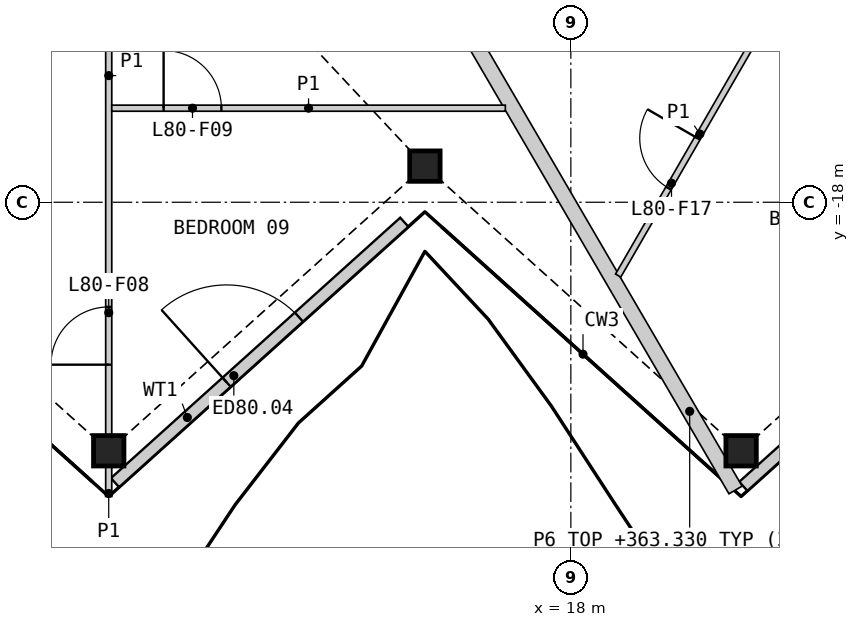
"""IFC4 building model, lengths in metres.
Left out: names, types, materials, properties, quantities, classifications, styles, units other than length and angle.
Written with IfcOpenShell. Run it as: python <this file> out.ifc"""

import sys

from ifc_helpers import new_model, si_unit, direction, frame, frame_2d, origin, origin_2d, place, context, subcontext, project, spatial, rectangle, hollow_rectangle, extrude, element, fill, save


model = new_model("IFC4")
c1 = context("Model", 3, precision=1e-05, world=origin(), true_north=direction((0.0, 1.0)))
c2 = subcontext(c1, "Body", "Model", "MODEL_VIEW")
j1 = project(units=[si_unit("LENGTHUNIT", "METRE"), si_unit("PLANEANGLEUNIT", "RADIAN")], contexts=[c1])
p1 = place(None, origin())
s1 = spatial("IfcSite", under=j1, at=p1, CompositionType="ELEMENT")
p2 = place(p1, origin())
s2 = spatial("IfcBuilding", under=s1, at=p2, CompositionType="ELEMENT")
p3 = place(p2, frame((0.0, 0.0, 361.0)))
s3 = spatial("IfcBuildingStorey", under=s2, at=p3, CompositionType="ELEMENT", Elevation=361.0)
for number, where, z_axis, x_axis in (
    (1, (10.4, -22.088, 0.0), (0.0, 0.0, 1.0), (1.0, 0.0, 0.0)),
    (2, (15.6, -17.406, 0.0), (0.0, 0.0, 1.0), (1.0, 0.0, 0.0)),
    (3, (20.8, -22.088, 0.0), (0.0, 0.0, 1.0), (1.0, 0.0, 0.0)),
):
    element("IfcColumn", number, at=place(p3, frame(where, z_axis=z_axis, x_axis=x_axis)), inside=s3, PredefinedType="COLUMN", context=c2, shape_type="SweptSolid", body=[
        extrude(hollow_rectangle(XDim=0.5, YDim=0.5, WallThickness=0.03, at=origin_2d()), origin(), (0.0, 0.0, 1.0), 3.4),
    ])
p4 = place(p3, frame((10.503, -22.612, 0.0), z_axis=(0.0, 0.0, 1.0), x_axis=(0.743148117717, 0.669126949939, 0.0)))
e4 = element("IfcWall", 4, at=p4, inside=s3, PredefinedType="SOLIDWALL", context=c2, shape_type="SweptSolid", body=[
    extrude(rectangle(XDim=6.402, YDim=0.2, at=frame_2d((3.201, 0.0))), origin(), (0.0, 0.0, 1.0), 2.634),
])
p5 = place(p4, frame((2.469, 0.0, 0.0)))
e5 = element("IfcOpeningElement", 5, at=p5, cuts=e4, PredefinedType="OPENING", context=c2, shape_type="SweptSolid", body=[
    extrude(rectangle(XDim=1.6, YDim=2.25, at=frame_2d((0.8, 1.125))), frame((0.0, 0.11, 0.0), z_axis=(0.0, -1.0, 0.0), x_axis=(1.0, 0.0, 0.0)), (0.0, 0.0, 1.0), 0.22),
])
p6 = place(p3, frame((20.837, -22.672, 0.0), z_axis=(0.0, 0.0, 1.0), x_axis=(0.743143698099, 0.669131858437, 0.0)))
e6 = element("IfcWall", 6, at=p6, inside=s3, PredefinedType="SOLIDWALL", context=c2, shape_type="SweptSolid", body=[
    extrude(rectangle(XDim=6.779, YDim=0.2, at=frame_2d((3.389, 0.0))), origin(), (0.0, 0.0, 1.0), 2.634),
])
p7 = place(p6, frame((2.559, 0.0, 0.0)))
e7 = element("IfcOpeningElement", 7, at=p7, cuts=e6, PredefinedType="OPENING", context=c2, shape_type="SweptSolid", body=[
    extrude(rectangle(XDim=1.6, YDim=2.25, at=frame_2d((0.8, 1.125))), frame((0.0, 0.11, 0.0), z_axis=(0.0, -1.0, 0.0), x_axis=(1.0, 0.0, 0.0)), (0.0, 0.0, 1.0), 0.22),
])
p8 = place(p3, frame((13.168, -9.798, 0.0), z_axis=(0.0, 0.0, 1.0), x_axis=(0.503632750219, -0.863917850786, 0.0)))
e8 = element("IfcWall", 8, at=p8, inside=s3, PredefinedType="PARTITIONING", context=c2, shape_type="SweptSolid", body=[
    extrude(rectangle(XDim=14.972, YDim=0.25, at=frame_2d((7.486, 0.0))), origin(), (0.0, 0.0, 1.0), 2.33),
])
p9 = place(p3, frame((16.216, -10.234, 0.0), z_axis=(0.0, 0.0, 1.0), x_axis=(0.777145059662, -0.629321504672, 0.0)))
e9 = element("IfcWall", 9, at=p9, inside=s3, PredefinedType="PARTITIONING", context=c2, shape_type="SweptSolid", body=[
    extrude(rectangle(XDim=12.59, YDim=0.1, at=frame_2d((6.295, 0.0))), origin(), (0.0, 0.0, 1.0), 2.33),
])
p10 = place(p9, frame((7.074, 0.0, 0.0)))
e10 = element("IfcOpeningElement", 10, at=p10, cuts=e9, PredefinedType="OPENING", context=c2, shape_type="SweptSolid", body=[
    extrude(rectangle(XDim=0.95, YDim=2.1, at=frame_2d((0.475, 1.05))), frame((0.0, 0.06, 0.0), z_axis=(0.0, -1.0, 0.0), x_axis=(1.0, 0.0, 0.0)), (0.0, 0.0, 1.0), 0.12),
])
p11 = place(p3, frame((10.4, -21.828, 0.0), z_axis=(0.0, 0.0, 1.0), x_axis=(0.0, 1.0, 0.0)))
e11 = element("IfcWall", 11, at=p11, inside=s3, PredefinedType="PARTITIONING", context=c2, shape_type="SweptSolid", body=[
    extrude(rectangle(XDim=11.822, YDim=0.1, at=frame_2d((5.911, 0.0))), origin(), (0.0, 0.0, 1.0), 2.33),
])
p12 = place(p11, frame((1.156, 0.0, 0.0)))
e12 = element("IfcOpeningElement", 12, at=p12, cuts=e11, PredefinedType="OPENING", context=c2, shape_type="SweptSolid", body=[
    extrude(rectangle(XDim=0.95, YDim=2.1, at=frame_2d((0.475, 1.05))), frame((0.0, 0.06, 0.0), z_axis=(0.0, -1.0, 0.0), x_axis=(1.0, 0.0, 0.0)), (0.0, 0.0, 1.0), 0.12),
])
p13 = place(p3, frame((10.45, -16.453, 0.0), z_axis=(0.0, 0.0, 1.0), x_axis=(1.0, 0.0, 0.0)))
e13 = element("IfcWall", 13, at=p13, inside=s3, PredefinedType="PARTITIONING", context=c2, shape_type="SweptSolid", body=[
    extrude(rectangle(XDim=6.473, YDim=0.1, at=frame_2d((3.236, 0.0))), origin(), (0.0, 0.0, 1.0), 2.33),
])
p14 = place(p13, frame((0.853, 0.0, 0.0)))
e14 = element("IfcOpeningElement", 14, at=p14, cuts=e13, PredefinedType="OPENING", context=c2, shape_type="SweptSolid", body=[
    extrude(rectangle(XDim=0.95, YDim=2.1, at=frame_2d((0.475, 1.05))), frame((0.0, 0.06, 0.0), z_axis=(0.0, -1.0, 0.0), x_axis=(1.0, 0.0, 0.0)), (0.0, 0.0, 1.0), 0.12),
])
p15 = place(p3, frame((18.778, -19.206, 0.0), z_axis=(0.0, 0.0, 1.0), x_axis=(0.499992359988, 0.866029814703, 0.0)))
e15 = element("IfcWall", 15, at=p15, inside=s3, PredefinedType="PARTITIONING", context=c2, shape_type="SweptSolid", body=[
    extrude(rectangle(XDim=5.376, YDim=0.1, at=frame_2d((2.688, 0.0))), origin(), (0.0, 0.0, 1.0), 2.33),
])
p16 = place(p15, frame((1.659, 0.0, 0.0)))
e16 = element("IfcOpeningElement", 16, at=p16, cuts=e15, PredefinedType="OPENING", context=c2, shape_type="SweptSolid", body=[
    extrude(rectangle(XDim=0.95, YDim=2.1, at=frame_2d((0.475, 1.05))), frame((0.0, 0.06, 0.0), z_axis=(0.0, -1.0, 0.0), x_axis=(1.0, 0.0, 0.0)), (0.0, 0.0, 1.0), 0.12),
])
p17 = place(p3, frame((10.4, -22.839, 0.0), z_axis=(0.0, 0.0, 1.0), x_axis=(0.0, 1.0, 0.0)))
e17 = element("IfcWall", 17, at=p17, inside=s3, PredefinedType="PARTITIONING", context=c2, shape_type="SweptSolid", body=[
    extrude(rectangle(XDim=0.491, YDim=0.1, at=frame_2d((0.246, 0.0))), origin(), (0.0, 0.0, 1.0), 2.33),
])
p18 = place(p5, origin())
e18 = element("IfcDoor", 18, at=p18, inside=s3, OperationType="DOUBLE_DOOR_SINGLE_SWING", PredefinedType="DOOR", context=c2, shape_type="SweptSolid", body=[
    extrude(rectangle(XDim=1.6, YDim=2.25, at=frame_2d((0.8, 1.125))), frame((0.0, 0.025, 0.0), z_axis=(0.0, -1.0, 0.0), x_axis=(1.0, 0.0, 0.0)), (0.0, 0.0, 1.0), 0.05),
])
fill(e5, e18)
p19 = place(p12, origin())
e19 = element("IfcDoor", 19, at=p19, inside=s3, OperationType="SINGLE_SWING_LEFT", PredefinedType="DOOR", context=c2, shape_type="SweptSolid", body=[
    extrude(rectangle(XDim=0.95, YDim=2.1, at=frame_2d((0.475, 1.05))), frame((0.0, 0.025, 0.0), z_axis=(0.0, -1.0, 0.0), x_axis=(1.0, 0.0, 0.0)), (0.0, 0.0, 1.0), 0.05),
])
fill(e12, e19)
p20 = place(p14, origin())
e20 = element("IfcDoor", 20, at=p20, inside=s3, OperationType="SINGLE_SWING_LEFT", PredefinedType="DOOR", context=c2, shape_type="SweptSolid", body=[
    extrude(rectangle(XDim=0.95, YDim=2.1, at=frame_2d((0.475, 1.05))), frame((0.0, 0.025, 0.0), z_axis=(0.0, -1.0, 0.0), x_axis=(1.0, 0.0, 0.0)), (0.0, 0.0, 1.0), 0.05),
])
fill(e14, e20)
p21 = place(p16, origin())
e21 = element("IfcDoor", 21, at=p21, inside=s3, OperationType="SINGLE_SWING_RIGHT", PredefinedType="DOOR", context=c2, shape_type="SweptSolid", body=[
    extrude(rectangle(XDim=0.95, YDim=2.1, at=frame_2d((0.475, 1.05))), frame((0.0, 0.025, 0.0), z_axis=(0.0, -1.0, 0.0), x_axis=(1.0, 0.0, 0.0)), (0.0, 0.0, 1.0), 0.05),
])
fill(e16, e21)
save(model, sys.argv[1])
